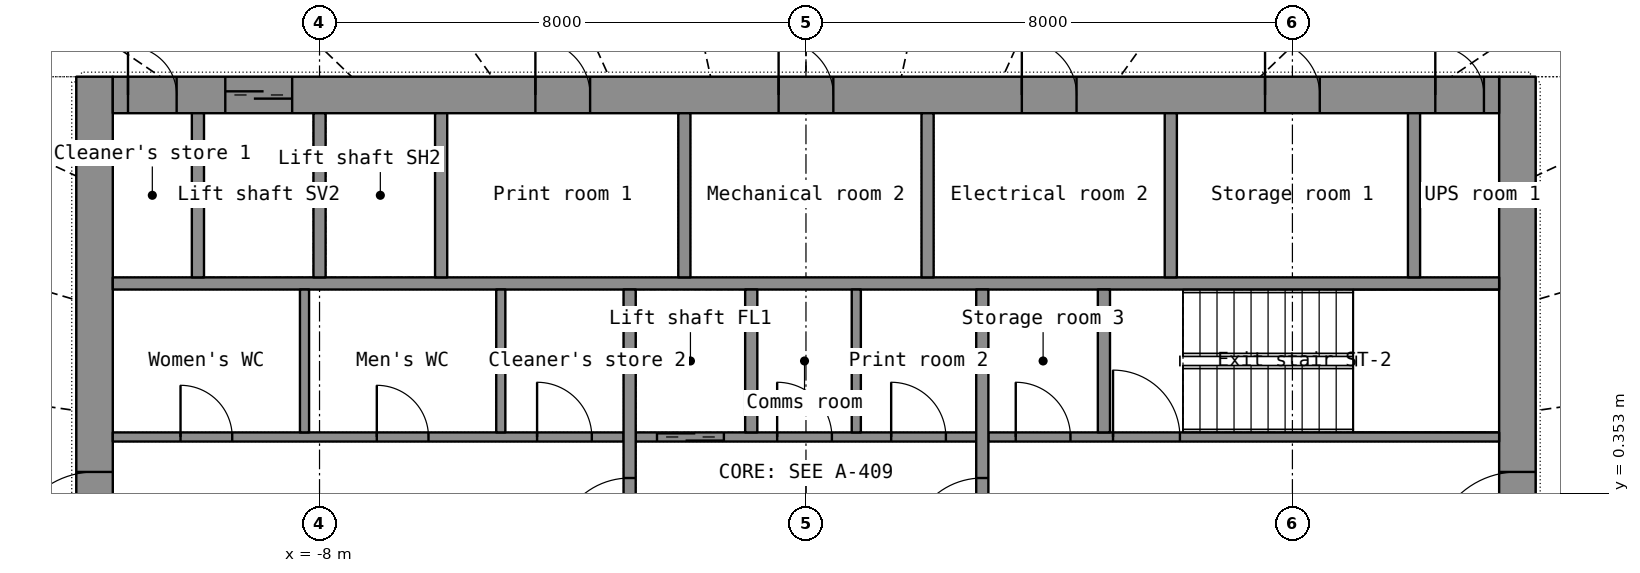
"""IFC4 building model, lengths in metres.
Left out: names, types, materials, properties, quantities, classifications, styles, units other than length and angle.
Written with IfcOpenShell. Run it as: python <this file> out.ifc"""

import sys

from ifc_helpers import new_model, si_unit, direction, frame, frame_2d, origin, place, context, subcontext, project, spatial, rectangle, extrude, element, fill, save


model = new_model("IFC4")
c1 = context("Model", 3, precision=1e-05, world=origin(), true_north=direction((0.0, 1.0)))
c2 = subcontext(c1, "Body", "Model", "MODEL_VIEW")
j1 = project(units=[si_unit("LENGTHUNIT", "METRE"), si_unit("PLANEANGLEUNIT", "RADIAN")], contexts=[c1])
p1 = place(None, origin())
s1 = spatial("IfcSite", under=j1, at=p1, CompositionType="ELEMENT")
p2 = place(p1, origin())
s2 = spatial("IfcBuilding", under=s1, at=p2, CompositionType="ELEMENT")
p3 = place(p2, frame((0.0, 0.0, 51.9)))
s3 = spatial("IfcBuildingStorey", under=s2, at=p3, CompositionType="ELEMENT", Elevation=51.9)
p4 = place(p3, frame((-11.7, -7.2, 0.0), z_axis=(0.0, 0.0, 1.0), x_axis=(0.0, 1.0, 0.0)))
e1 = element("IfcWall", 1, at=p4, inside=s3, PredefinedType="SHEAR", context=c2, shape_type="SweptSolid", body=[
    extrude(rectangle(XDim=14.4, YDim=0.6, at=frame_2d((7.2, 0.0))), origin(), (0.0, 0.0, 1.0), 3.3),
])
p5 = place(p4, frame((6.5, 0.0, 0.0)))
e2 = element("IfcOpeningElement", 2, at=p5, cuts=e1, PredefinedType="OPENING", context=c2, shape_type="SweptSolid", body=[
    extrude(rectangle(XDim=1.4, YDim=2.2, at=frame_2d((0.7, 1.1))), frame((0.0, 0.31, 0.0), z_axis=(0.0, -1.0, 0.0), x_axis=(1.0, 0.0, 0.0)), (0.0, 0.0, 1.0), 0.62),
])
p6 = place(p3, frame((11.7, -7.2, 0.0), z_axis=(0.0, 0.0, 1.0), x_axis=(0.0, 1.0, 0.0)))
e3 = element("IfcWall", 3, at=p6, inside=s3, PredefinedType="SHEAR", context=c2, shape_type="SweptSolid", body=[
    extrude(rectangle(XDim=14.4, YDim=0.6, at=frame_2d((7.2, 0.0))), origin(), (0.0, 0.0, 1.0), 3.3),
])
p7 = place(p6, frame((6.5, 0.0, 0.0)))
e4 = element("IfcOpeningElement", 4, at=p7, cuts=e3, PredefinedType="OPENING", context=c2, shape_type="SweptSolid", body=[
    extrude(rectangle(XDim=1.4, YDim=2.2, at=frame_2d((0.7, 1.1))), frame((0.0, 0.31, 0.0), z_axis=(0.0, -1.0, 0.0), x_axis=(1.0, 0.0, 0.0)), (0.0, 0.0, 1.0), 0.62),
])
p8 = place(p3, frame((-11.4, 6.9, 0.0), z_axis=(0.0, 0.0, 1.0), x_axis=(1.0, 0.0, 0.0)))
e5 = element("IfcWall", 5, at=p8, inside=s3, PredefinedType="SHEAR", context=c2, shape_type="SweptSolid", body=[
    extrude(rectangle(XDim=22.8, YDim=0.6, at=frame_2d((11.4, 0.0))), origin(), (0.0, 0.0, 1.0), 3.3),
])
p9 = place(p8, frame((1.85, 0.0, 0.0)))
e6 = element("IfcOpeningElement", 6, at=p9, cuts=e5, PredefinedType="OPENING", context=c2, shape_type="SweptSolid", body=[
    extrude(rectangle(XDim=1.1, YDim=2.2, at=frame_2d((0.55, 1.1))), frame((0.0, 0.31, 0.0), z_axis=(0.0, -1.0, 0.0), x_axis=(1.0, 0.0, 0.0)), (0.0, 0.0, 1.0), 0.62),
])
p10 = place(p8, frame((6.95, 0.0, 0.0)))
e7 = element("IfcOpeningElement", 7, at=p10, cuts=e5, PredefinedType="OPENING", context=c2, shape_type="SweptSolid", body=[
    extrude(rectangle(XDim=0.9, YDim=2.1, at=frame_2d((0.45, 1.05))), frame((0.0, 0.31, 0.0), z_axis=(0.0, -1.0, 0.0), x_axis=(1.0, 0.0, 0.0)), (0.0, 0.0, 1.0), 0.62),
])
p11 = place(p8, frame((10.95, 0.0, 0.0)))
e8 = element("IfcOpeningElement", 8, at=p11, cuts=e5, PredefinedType="OPENING", context=c2, shape_type="SweptSolid", body=[
    extrude(rectangle(XDim=0.9, YDim=2.1, at=frame_2d((0.45, 1.05))), frame((0.0, 0.31, 0.0), z_axis=(0.0, -1.0, 0.0), x_axis=(1.0, 0.0, 0.0)), (0.0, 0.0, 1.0), 0.62),
])
p12 = place(p8, frame((14.95, 0.0, 0.0)))
e9 = element("IfcOpeningElement", 9, at=p12, cuts=e5, PredefinedType="OPENING", context=c2, shape_type="SweptSolid", body=[
    extrude(rectangle(XDim=0.9, YDim=2.1, at=frame_2d((0.45, 1.05))), frame((0.0, 0.31, 0.0), z_axis=(0.0, -1.0, 0.0), x_axis=(1.0, 0.0, 0.0)), (0.0, 0.0, 1.0), 0.62),
])
p13 = place(p8, frame((18.95, 0.0, 0.0)))
e10 = element("IfcOpeningElement", 10, at=p13, cuts=e5, PredefinedType="OPENING", context=c2, shape_type="SweptSolid", body=[
    extrude(rectangle(XDim=0.9, YDim=2.1, at=frame_2d((0.45, 1.05))), frame((0.0, 0.31, 0.0), z_axis=(0.0, -1.0, 0.0), x_axis=(1.0, 0.0, 0.0)), (0.0, 0.0, 1.0), 0.62),
])
p14 = place(p8, frame((0.25, 0.0, 0.0)))
e11 = element("IfcOpeningElement", 11, at=p14, cuts=e5, PredefinedType="OPENING", context=c2, shape_type="SweptSolid", body=[
    extrude(rectangle(XDim=0.8, YDim=2.05, at=frame_2d((0.4, 1.025))), frame((0.0, 0.31, 0.0), z_axis=(0.0, -1.0, 0.0), x_axis=(1.0, 0.0, 0.0)), (0.0, 0.0, 1.0), 0.62),
])
p15 = place(p8, frame((21.75, 0.0, 0.0)))
e12 = element("IfcOpeningElement", 12, at=p15, cuts=e5, PredefinedType="OPENING", context=c2, shape_type="SweptSolid", body=[
    extrude(rectangle(XDim=0.8, YDim=2.05, at=frame_2d((0.4, 1.025))), frame((0.0, 0.31, 0.0), z_axis=(0.0, -1.0, 0.0), x_axis=(1.0, 0.0, 0.0)), (0.0, 0.0, 1.0), 0.62),
])
p16 = place(p3, frame((-11.4, 3.8, 0.0), z_axis=(0.0, 0.0, 1.0), x_axis=(1.0, 0.0, 0.0)))
e13 = element("IfcWall", 13, at=p16, inside=s3, PredefinedType="SHEAR", context=c2, shape_type="SweptSolid", body=[
    extrude(rectangle(XDim=22.8, YDim=0.2, at=frame_2d((11.4, 0.0))), origin(), (0.0, 0.0, 1.0), 3.3),
])
for number, where, z_axis, x_axis in (
    (14, (-10.0, 3.9, 0.0), (0.0, 0.0, 1.0), (0.0, 1.0, 0.0)),
    (15, (-8.0, 3.9, 0.0), (0.0, 0.0, 1.0), (0.0, 1.0, 0.0)),
    (16, (-6.0, 3.9, 0.0), (0.0, 0.0, 1.0), (0.0, 1.0, 0.0)),
    (17, (10.0, 3.9, 0.0), (0.0, 0.0, 1.0), (0.0, 1.0, 0.0)),
):
    element("IfcWall", number, at=place(p3, frame(where, z_axis=z_axis, x_axis=x_axis)), inside=s3, PredefinedType="SHEAR", context=c2, shape_type="SweptSolid", body=[
        extrude(rectangle(XDim=2.7, YDim=0.2, at=frame_2d((1.35, 0.0))), origin(), (0.0, 0.0, 1.0), 3.3),
    ])
for number, where, z_axis, x_axis in (
    (18, (-2.0, 3.9, 0.0), (0.0, 0.0, 1.0), (0.0, 1.0, 0.0)),
    (19, (2.0, 3.9, 0.0), (0.0, 0.0, 1.0), (0.0, 1.0, 0.0)),
    (20, (6.0, 3.9, 0.0), (0.0, 0.0, 1.0), (0.0, 1.0, 0.0)),
):
    element("IfcWall", number, at=place(p3, frame(where, z_axis=z_axis, x_axis=x_axis)), inside=s3, PredefinedType="PARTITIONING", context=c2, shape_type="SweptSolid", body=[
        extrude(rectangle(XDim=2.7, YDim=0.2, at=frame_2d((1.35, 0.0))), origin(), (0.0, 0.0, 1.0), 3.3),
    ])
p17 = place(p3, frame((-11.4, 1.275, 0.0), z_axis=(0.0, 0.0, 1.0), x_axis=(1.0, 0.0, 0.0)))
e21 = element("IfcWall", 21, at=p17, inside=s3, PredefinedType="PARTITIONING", context=c2, shape_type="SweptSolid", body=[
    extrude(rectangle(XDim=8.4, YDim=0.15, at=frame_2d((4.2, 0.0))), origin(), (0.0, 0.0, 1.0), 3.3),
])
p18 = place(p17, frame((1.114, 0.0, 0.0)))
e22 = element("IfcOpeningElement", 22, at=p18, cuts=e21, PredefinedType="OPENING", context=c2, shape_type="SweptSolid", body=[
    extrude(rectangle(XDim=0.85, YDim=2.1, at=frame_2d((0.425, 1.05))), frame((0.0, 0.085, 0.0), z_axis=(0.0, -1.0, 0.0), x_axis=(1.0, 0.0, 0.0)), (0.0, 0.0, 1.0), 0.17),
])
p19 = place(p17, frame((4.342, 0.0, 0.0)))
e23 = element("IfcOpeningElement", 23, at=p19, cuts=e21, PredefinedType="OPENING", context=c2, shape_type="SweptSolid", body=[
    extrude(rectangle(XDim=0.85, YDim=2.1, at=frame_2d((0.425, 1.05))), frame((0.0, 0.085, 0.0), z_axis=(0.0, -1.0, 0.0), x_axis=(1.0, 0.0, 0.0)), (0.0, 0.0, 1.0), 0.17),
])
p20 = place(p17, frame((6.978, 0.0, 0.0)))
e24 = element("IfcOpeningElement", 24, at=p20, cuts=e21, PredefinedType="OPENING", context=c2, shape_type="SweptSolid", body=[
    extrude(rectangle(XDim=0.9, YDim=2.1, at=frame_2d((0.45, 1.05))), frame((0.0, 0.085, 0.0), z_axis=(0.0, -1.0, 0.0), x_axis=(1.0, 0.0, 0.0)), (0.0, 0.0, 1.0), 0.17),
])
p21 = place(p3, frame((-2.8, 1.275, 0.0), z_axis=(0.0, 0.0, 1.0), x_axis=(1.0, 0.0, 0.0)))
e25 = element("IfcWall", 25, at=p21, inside=s3, PredefinedType="SHEAR", context=c2, shape_type="SweptSolid", body=[
    extrude(rectangle(XDim=5.6, YDim=0.15, at=frame_2d((2.8, 0.0))), origin(), (0.0, 0.0, 1.0), 3.3),
])
p22 = place(p21, frame((0.35, 0.0, 0.0)))
e26 = element("IfcOpeningElement", 26, at=p22, cuts=e25, PredefinedType="OPENING", context=c2, shape_type="SweptSolid", body=[
    extrude(rectangle(XDim=1.1, YDim=2.2, at=frame_2d((0.55, 1.1))), frame((0.0, 0.085, 0.0), z_axis=(0.0, -1.0, 0.0), x_axis=(1.0, 0.0, 0.0)), (0.0, 0.0, 1.0), 0.17),
])
p23 = place(p21, frame((2.326, 0.0, 0.0)))
e27 = element("IfcOpeningElement", 27, at=p23, cuts=e25, PredefinedType="OPENING", context=c2, shape_type="SweptSolid", body=[
    extrude(rectangle(XDim=0.9, YDim=2.1, at=frame_2d((0.45, 1.05))), frame((0.0, 0.085, 0.0), z_axis=(0.0, -1.0, 0.0), x_axis=(1.0, 0.0, 0.0)), (0.0, 0.0, 1.0), 0.17),
])
p24 = place(p21, frame((4.201, 0.0, 0.0)))
e28 = element("IfcOpeningElement", 28, at=p24, cuts=e25, PredefinedType="OPENING", context=c2, shape_type="SweptSolid", body=[
    extrude(rectangle(XDim=0.9, YDim=2.1, at=frame_2d((0.45, 1.05))), frame((0.0, 0.085, 0.0), z_axis=(0.0, -1.0, 0.0), x_axis=(1.0, 0.0, 0.0)), (0.0, 0.0, 1.0), 0.17),
])
p25 = place(p3, frame((3.0, 1.275, 0.0), z_axis=(0.0, 0.0, 1.0), x_axis=(1.0, 0.0, 0.0)))
e29 = element("IfcWall", 29, at=p25, inside=s3, PredefinedType="SHEAR", context=c2, shape_type="SweptSolid", body=[
    extrude(rectangle(XDim=8.4, YDim=0.15, at=frame_2d((4.2, 0.0))), origin(), (0.0, 0.0, 1.0), 3.3),
])
p26 = place(p25, frame((2.05, 0.0, 0.0)))
e30 = element("IfcOpeningElement", 30, at=p26, cuts=e29, PredefinedType="OPENING", context=c2, shape_type="SweptSolid", body=[
    extrude(rectangle(XDim=1.1, YDim=2.15, at=frame_2d((0.55, 1.075))), frame((0.0, 0.085, 0.0), z_axis=(0.0, -1.0, 0.0), x_axis=(1.0, 0.0, 0.0)), (0.0, 0.0, 1.0), 0.17),
])
p27 = place(p25, frame((0.45, 0.0, 0.0)))
e31 = element("IfcOpeningElement", 31, at=p27, cuts=e29, PredefinedType="OPENING", context=c2, shape_type="SweptSolid", body=[
    extrude(rectangle(XDim=0.9, YDim=2.1, at=frame_2d((0.45, 1.05))), frame((0.0, 0.085, 0.0), z_axis=(0.0, -1.0, 0.0), x_axis=(1.0, 0.0, 0.0)), (0.0, 0.0, 1.0), 0.17),
])
p28 = place(p3, frame((-2.9, -3.7, 0.0), z_axis=(0.0, 0.0, 1.0), x_axis=(0.0, 1.0, 0.0)))
e32 = element("IfcWall", 32, at=p28, inside=s3, PredefinedType="SHEAR", context=c2, shape_type="SweptSolid", body=[
    extrude(rectangle(XDim=7.4, YDim=0.2, at=frame_2d((3.7, 0.0))), origin(), (0.0, 0.0, 1.0), 3.3),
])
p29 = place(p28, frame((3.1, 0.0, 0.0)))
e33 = element("IfcOpeningElement", 33, at=p29, cuts=e32, PredefinedType="OPENING", context=c2, shape_type="SweptSolid", body=[
    extrude(rectangle(XDim=1.2, YDim=2.2, at=frame_2d((0.6, 1.1))), frame((0.0, 0.11, 0.0), z_axis=(0.0, -1.0, 0.0), x_axis=(1.0, 0.0, 0.0)), (0.0, 0.0, 1.0), 0.22),
])
p30 = place(p3, frame((2.9, -3.7, 0.0), z_axis=(0.0, 0.0, 1.0), x_axis=(0.0, 1.0, 0.0)))
e34 = element("IfcWall", 34, at=p30, inside=s3, PredefinedType="SHEAR", context=c2, shape_type="SweptSolid", body=[
    extrude(rectangle(XDim=7.4, YDim=0.2, at=frame_2d((3.7, 0.0))), origin(), (0.0, 0.0, 1.0), 3.3),
])
p31 = place(p30, frame((3.1, 0.0, 0.0)))
e35 = element("IfcOpeningElement", 35, at=p31, cuts=e34, PredefinedType="OPENING", context=c2, shape_type="SweptSolid", body=[
    extrude(rectangle(XDim=1.2, YDim=2.2, at=frame_2d((0.6, 1.1))), frame((0.0, 0.11, 0.0), z_axis=(0.0, -1.0, 0.0), x_axis=(1.0, 0.0, 0.0)), (0.0, 0.0, 1.0), 0.22),
])
for number, where, z_axis, x_axis in (
    (36, (-0.9, 1.35, 0.0), (0.0, 0.0, 1.0), (0.0, 1.0, 0.0)),
    (37, (4.9, 1.35, 0.0), (0.0, 0.0, 1.0), (0.0, 1.0, 0.0)),
):
    element("IfcWall", number, at=place(p3, frame(where, z_axis=z_axis, x_axis=x_axis)), inside=s3, PredefinedType="SHEAR", context=c2, shape_type="SweptSolid", body=[
        extrude(rectangle(XDim=2.35, YDim=0.2, at=frame_2d((1.175, 0.0))), origin(), (0.0, 0.0, 1.0), 3.3),
    ])
for number, where, z_axis, x_axis in (
    (38, (-8.247, 1.35, 0.0), (0.0, 0.0, 1.0), (0.0, 1.0, 0.0)),
    (39, (-5.019, 1.35, 0.0), (0.0, 0.0, 1.0), (0.0, 1.0, 0.0)),
    (40, (0.827, 1.35, 0.0), (0.0, 0.0, 1.0), (0.0, 1.0, 0.0)),
):
    element("IfcWall", number, at=place(p3, frame(where, z_axis=z_axis, x_axis=x_axis)), inside=s3, PredefinedType="PARTITIONING", context=c2, shape_type="SweptSolid", body=[
        extrude(rectangle(XDim=2.35, YDim=0.15, at=frame_2d((1.175, 0.0))), origin(), (0.0, 0.0, 1.0), 3.3),
    ])
p32 = place(p9, origin())
e41 = element("IfcDoor", 41, at=p32, inside=s3, OperationType="DOUBLE_DOOR_SLIDING", PredefinedType="DOOR", context=c2, shape_type="SweptSolid", body=[
    extrude(rectangle(XDim=1.1, YDim=2.2, at=frame_2d((0.55, 1.1))), frame((0.0, 0.025, 0.0), z_axis=(0.0, -1.0, 0.0), x_axis=(1.0, 0.0, 0.0)), (0.0, 0.0, 1.0), 0.05),
])
fill(e6, e41)
p33 = place(p10, origin())
e42 = element("IfcDoor", 42, at=p33, inside=s3, OperationType="SINGLE_SWING_LEFT", PredefinedType="DOOR", context=c2, shape_type="SweptSolid", body=[
    extrude(rectangle(XDim=0.9, YDim=2.1, at=frame_2d((0.45, 1.05))), frame((0.0, 0.025, 0.0), z_axis=(0.0, -1.0, 0.0), x_axis=(1.0, 0.0, 0.0)), (0.0, 0.0, 1.0), 0.05),
])
fill(e7, e42)
p34 = place(p11, origin())
e43 = element("IfcDoor", 43, at=p34, inside=s3, OperationType="SINGLE_SWING_LEFT", PredefinedType="DOOR", context=c2, shape_type="SweptSolid", body=[
    extrude(rectangle(XDim=0.9, YDim=2.1, at=frame_2d((0.45, 1.05))), frame((0.0, 0.025, 0.0), z_axis=(0.0, -1.0, 0.0), x_axis=(1.0, 0.0, 0.0)), (0.0, 0.0, 1.0), 0.05),
])
fill(e8, e43)
p35 = place(p12, origin())
e44 = element("IfcDoor", 44, at=p35, inside=s3, OperationType="SINGLE_SWING_LEFT", PredefinedType="DOOR", context=c2, shape_type="SweptSolid", body=[
    extrude(rectangle(XDim=0.9, YDim=2.1, at=frame_2d((0.45, 1.05))), frame((0.0, 0.025, 0.0), z_axis=(0.0, -1.0, 0.0), x_axis=(1.0, 0.0, 0.0)), (0.0, 0.0, 1.0), 0.05),
])
fill(e9, e44)
p36 = place(p13, origin())
e45 = element("IfcDoor", 45, at=p36, inside=s3, OperationType="SINGLE_SWING_LEFT", PredefinedType="DOOR", context=c2, shape_type="SweptSolid", body=[
    extrude(rectangle(XDim=0.9, YDim=2.1, at=frame_2d((0.45, 1.05))), frame((0.0, 0.025, 0.0), z_axis=(0.0, -1.0, 0.0), x_axis=(1.0, 0.0, 0.0)), (0.0, 0.0, 1.0), 0.05),
])
fill(e10, e45)
p37 = place(p14, origin())
e46 = element("IfcDoor", 46, at=p37, inside=s3, OperationType="SINGLE_SWING_LEFT", PredefinedType="DOOR", context=c2, shape_type="SweptSolid", body=[
    extrude(rectangle(XDim=0.8, YDim=2.05, at=frame_2d((0.4, 1.025))), frame((0.0, 0.025, 0.0), z_axis=(0.0, -1.0, 0.0), x_axis=(1.0, 0.0, 0.0)), (0.0, 0.0, 1.0), 0.05),
])
fill(e11, e46)
p38 = place(p15, origin())
e47 = element("IfcDoor", 47, at=p38, inside=s3, OperationType="SINGLE_SWING_LEFT", PredefinedType="DOOR", context=c2, shape_type="SweptSolid", body=[
    extrude(rectangle(XDim=0.8, YDim=2.05, at=frame_2d((0.4, 1.025))), frame((0.0, 0.025, 0.0), z_axis=(0.0, -1.0, 0.0), x_axis=(1.0, 0.0, 0.0)), (0.0, 0.0, 1.0), 0.05),
])
fill(e12, e47)
p39 = place(p5, origin())
e48 = element("IfcDoor", 48, at=p39, inside=s3, OperationType="DOUBLE_DOOR_SINGLE_SWING", PredefinedType="DOOR", context=c2, shape_type="SweptSolid", body=[
    extrude(rectangle(XDim=1.4, YDim=2.2, at=frame_2d((0.7, 1.1))), frame((0.0, 0.025, 0.0), z_axis=(0.0, -1.0, 0.0), x_axis=(1.0, 0.0, 0.0)), (0.0, 0.0, 1.0), 0.05),
])
fill(e2, e48)
p40 = place(p7, origin())
e49 = element("IfcDoor", 49, at=p40, inside=s3, OperationType="DOUBLE_DOOR_SINGLE_SWING", PredefinedType="DOOR", context=c2, shape_type="SweptSolid", body=[
    extrude(rectangle(XDim=1.4, YDim=2.2, at=frame_2d((0.7, 1.1))), frame((0.0, 0.025, 0.0), z_axis=(0.0, -1.0, 0.0), x_axis=(1.0, 0.0, 0.0)), (0.0, 0.0, 1.0), 0.05),
])
fill(e4, e49)
p41 = place(p29, origin())
e50 = element("IfcDoor", 50, at=p41, inside=s3, OperationType="SINGLE_SWING_LEFT", PredefinedType="DOOR", context=c2, shape_type="SweptSolid", body=[
    extrude(rectangle(XDim=1.2, YDim=2.2, at=frame_2d((0.6, 1.1))), frame((0.0, 0.025, 0.0), z_axis=(0.0, -1.0, 0.0), x_axis=(1.0, 0.0, 0.0)), (0.0, 0.0, 1.0), 0.05),
])
fill(e33, e50)
p42 = place(p31, origin())
e51 = element("IfcDoor", 51, at=p42, inside=s3, OperationType="SINGLE_SWING_LEFT", PredefinedType="DOOR", context=c2, shape_type="SweptSolid", body=[
    extrude(rectangle(XDim=1.2, YDim=2.2, at=frame_2d((0.6, 1.1))), frame((0.0, 0.025, 0.0), z_axis=(0.0, -1.0, 0.0), x_axis=(1.0, 0.0, 0.0)), (0.0, 0.0, 1.0), 0.05),
])
fill(e35, e51)
p43 = place(p22, origin())
e52 = element("IfcDoor", 52, at=p43, inside=s3, OperationType="DOUBLE_DOOR_SLIDING", PredefinedType="DOOR", context=c2, shape_type="SweptSolid", body=[
    extrude(rectangle(XDim=1.1, YDim=2.2, at=frame_2d((0.55, 1.1))), frame((0.0, 0.025, 0.0), z_axis=(0.0, -1.0, 0.0), x_axis=(1.0, 0.0, 0.0)), (0.0, 0.0, 1.0), 0.05),
])
fill(e26, e52)
p44 = place(p26, origin())
e53 = element("IfcDoor", 53, at=p44, inside=s3, OperationType="SINGLE_SWING_LEFT", PredefinedType="DOOR", context=c2, shape_type="SweptSolid", body=[
    extrude(rectangle(XDim=1.1, YDim=2.15, at=frame_2d((0.55, 1.075))), frame((0.0, 0.025, 0.0), z_axis=(0.0, -1.0, 0.0), x_axis=(1.0, 0.0, 0.0)), (0.0, 0.0, 1.0), 0.05),
])
fill(e30, e53)
p45 = place(p18, origin())
e54 = element("IfcDoor", 54, at=p45, inside=s3, OperationType="SINGLE_SWING_LEFT", PredefinedType="DOOR", context=c2, shape_type="SweptSolid", body=[
    extrude(rectangle(XDim=0.85, YDim=2.1, at=frame_2d((0.425, 1.05))), frame((0.0, 0.025, 0.0), z_axis=(0.0, -1.0, 0.0), x_axis=(1.0, 0.0, 0.0)), (0.0, 0.0, 1.0), 0.05),
])
fill(e22, e54)
p46 = place(p19, origin())
e55 = element("IfcDoor", 55, at=p46, inside=s3, OperationType="SINGLE_SWING_LEFT", PredefinedType="DOOR", context=c2, shape_type="SweptSolid", body=[
    extrude(rectangle(XDim=0.85, YDim=2.1, at=frame_2d((0.425, 1.05))), frame((0.0, 0.025, 0.0), z_axis=(0.0, -1.0, 0.0), x_axis=(1.0, 0.0, 0.0)), (0.0, 0.0, 1.0), 0.05),
])
fill(e23, e55)
p47 = place(p20, origin())
e56 = element("IfcDoor", 56, at=p47, inside=s3, OperationType="SINGLE_SWING_LEFT", PredefinedType="DOOR", context=c2, shape_type="SweptSolid", body=[
    extrude(rectangle(XDim=0.9, YDim=2.1, at=frame_2d((0.45, 1.05))), frame((0.0, 0.025, 0.0), z_axis=(0.0, -1.0, 0.0), x_axis=(1.0, 0.0, 0.0)), (0.0, 0.0, 1.0), 0.05),
])
fill(e24, e56)
p48 = place(p23, origin())
e57 = element("IfcDoor", 57, at=p48, inside=s3, OperationType="SINGLE_SWING_LEFT", PredefinedType="DOOR", context=c2, shape_type="SweptSolid", body=[
    extrude(rectangle(XDim=0.9, YDim=2.1, at=frame_2d((0.45, 1.05))), frame((0.0, 0.025, 0.0), z_axis=(0.0, -1.0, 0.0), x_axis=(1.0, 0.0, 0.0)), (0.0, 0.0, 1.0), 0.05),
])
fill(e27, e57)
p49 = place(p24, origin())
e58 = element("IfcDoor", 58, at=p49, inside=s3, OperationType="SINGLE_SWING_LEFT", PredefinedType="DOOR", context=c2, shape_type="SweptSolid", body=[
    extrude(rectangle(XDim=0.9, YDim=2.1, at=frame_2d((0.45, 1.05))), frame((0.0, 0.025, 0.0), z_axis=(0.0, -1.0, 0.0), x_axis=(1.0, 0.0, 0.0)), (0.0, 0.0, 1.0), 0.05),
])
fill(e28, e58)
p50 = place(p27, origin())
e59 = element("IfcDoor", 59, at=p50, inside=s3, OperationType="SINGLE_SWING_LEFT", PredefinedType="DOOR", context=c2, shape_type="SweptSolid", body=[
    extrude(rectangle(XDim=0.9, YDim=2.1, at=frame_2d((0.45, 1.05))), frame((0.0, 0.025, 0.0), z_axis=(0.0, -1.0, 0.0), x_axis=(1.0, 0.0, 0.0)), (0.0, 0.0, 1.0), 0.05),
])
fill(e31, e59)
save(model, sys.argv[1])
